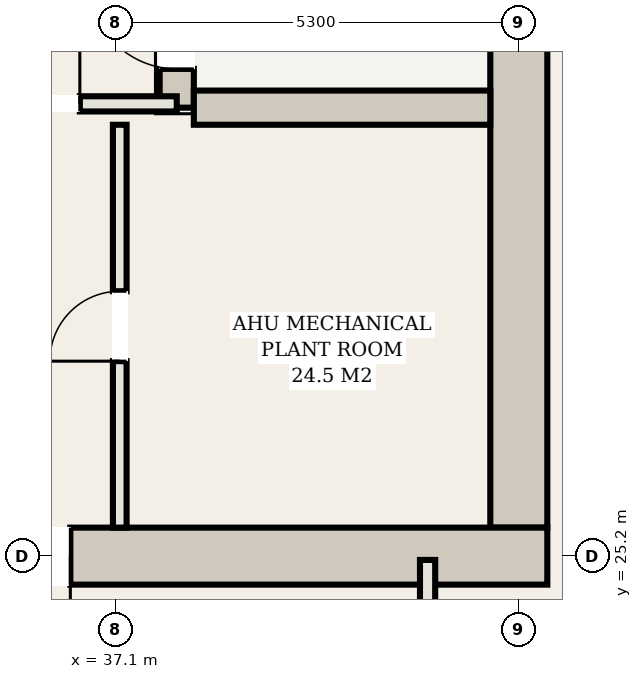
"""IFC4 building model, lengths in metres.
Left out: names, types, materials, properties, quantities, classifications, styles, units other than length and angle.
Written with IfcOpenShell. Run it as: python <this file> out.ifc"""

import sys

from ifc_helpers import new_model, si_unit, direction, frame, frame_2d, origin, place, context, subcontext, project, spatial, rectangle, extrude, element, fill, save


model = new_model("IFC4")
c1 = context("Model", 3, precision=1e-05, world=origin(), true_north=direction((0.0, 1.0)))
c2 = subcontext(c1, "Body", "Model", "MODEL_VIEW")
j1 = project(units=[si_unit("LENGTHUNIT", "METRE"), si_unit("PLANEANGLEUNIT", "RADIAN")], contexts=[c1])
p1 = place(None, origin())
s1 = spatial("IfcSite", under=j1, at=p1, CompositionType="ELEMENT")
p2 = place(p1, origin())
s2 = spatial("IfcBuilding", under=s1, at=p2, CompositionType="ELEMENT")
p3 = place(p2, frame((0.0, 0.0, 70.4)))
s3 = spatial("IfcBuildingStorey", under=s2, at=p3, CompositionType="ELEMENT", Elevation=70.4)
p4 = place(p3, frame((42.4, 25.575, 0.0), z_axis=(0.0, 0.0, 1.0), x_axis=(0.0, 1.0, 0.0)))
e1 = element("IfcWall", 1, at=p4, inside=s3, PredefinedType="SHEAR", context=c2, shape_type="SweptSolid", body=[
    extrude(rectangle(XDim=14.05, YDim=0.75, at=frame_2d((7.025, 0.0))), origin(), (0.0, 0.0, 1.0), 6.56),
])
p5 = place(p3, frame((34.6, 25.2, 0.0), z_axis=(0.0, 0.0, 1.0), x_axis=(1.0, 0.0, 0.0)))
e2 = element("IfcWall", 2, at=p5, inside=s3, PredefinedType="SHEAR", context=c2, shape_type="SweptSolid", body=[
    extrude(rectangle(XDim=8.175, YDim=0.75, at=frame_2d((4.087, 0.0))), origin(), (0.0, 0.0, 1.0), 6.56),
])
p6 = place(p5, frame((0.65, 0.0, 0.0)))
e3 = element("IfcOpeningElement", 3, at=p6, cuts=e2, PredefinedType="OPENING", context=c2, shape_type="SweptSolid", body=[
    extrude(rectangle(XDim=1.25, YDim=2.2, at=frame_2d((0.625, 1.1))), frame((0.0, 0.385, 0.0), z_axis=(0.0, -1.0, 0.0), x_axis=(1.0, 0.0, 0.0)), (0.0, 0.0, 1.0), 0.77),
])
p7 = place(p3, frame((37.9, 31.1, 0.0), z_axis=(0.0, 0.0, 1.0), x_axis=(0.0, 1.0, 0.0)))
e4 = element("IfcWall", 4, at=p7, inside=s3, PredefinedType="SHEAR", context=c2, shape_type="SweptSolid", body=[
    extrude(rectangle(XDim=8.525, YDim=0.45, at=frame_2d((4.262, 0.0))), origin(), (0.0, 0.0, 1.0), 6.56),
])
p8 = place(p7, frame((0.51, 0.0, 0.0)))
e5 = element("IfcOpeningElement", 5, at=p8, cuts=e4, PredefinedType="OPENING", context=c2, shape_type="SweptSolid", body=[
    extrude(rectangle(XDim=1.15, YDim=2.2, at=frame_2d((0.575, 1.1))), frame((0.0, 0.235, 0.0), z_axis=(0.0, -1.0, 0.0), x_axis=(1.0, 0.0, 0.0)), (0.0, 0.0, 1.0), 0.47),
])
p9 = place(p3, frame((38.125, 31.1, 0.0), z_axis=(0.0, 0.0, 1.0), x_axis=(1.0, 0.0, 0.0)))
e6 = element("IfcWall", 6, at=p9, inside=s3, PredefinedType="SHEAR", context=c2, shape_type="SweptSolid", body=[
    extrude(rectangle(XDim=3.9, YDim=0.45, at=frame_2d((1.95, 0.0))), origin(), (0.0, 0.0, 1.0), 6.56),
])
p10 = place(p3, frame((34.65, 31.15, 0.0), z_axis=(0.0, 0.0, 1.0), x_axis=(1.0, 0.0, 0.0)))
e7 = element("IfcWall", 7, at=p10, inside=s3, PredefinedType="PARTITIONING", context=c2, shape_type="SweptSolid", body=[
    extrude(rectangle(XDim=3.25, YDim=0.2, at=frame_2d((1.625, 0.0))), origin(), (0.0, 0.0, 1.0), 6.56),
])
p11 = place(p10, frame((0.725, 0.0, 0.0)))
e8 = element("IfcOpeningElement", 8, at=p11, cuts=e7, PredefinedType="OPENING", context=c2, shape_type="SweptSolid", body=[
    extrude(rectangle(XDim=1.25, YDim=2.2, at=frame_2d((0.625, 1.1))), frame((0.0, 0.11, 0.0), z_axis=(0.0, -1.0, 0.0), x_axis=(1.0, 0.0, 0.0)), (0.0, 0.0, 1.0), 0.22),
])
p12 = place(p3, frame((37.15, 25.575, 0.0), z_axis=(0.0, 0.0, 1.0), x_axis=(0.0, 1.0, 0.0)))
e9 = element("IfcWall", 9, at=p12, inside=s3, PredefinedType="PARTITIONING", context=c2, shape_type="SweptSolid", body=[
    extrude(rectangle(XDim=5.3, YDim=0.18, at=frame_2d((2.65, 0.0))), origin(), (0.0, 0.0, 1.0), 5.055),
])
p13 = place(p12, frame((2.19, 0.0, 0.0)))
e10 = element("IfcOpeningElement", 10, at=p13, cuts=e9, PredefinedType="OPENING", context=c2, shape_type="SweptSolid", body=[
    extrude(rectangle(XDim=0.92, YDim=2.15, at=frame_2d((0.46, 1.075))), frame((0.0, 0.1, 0.0), z_axis=(0.0, -1.0, 0.0), x_axis=(1.0, 0.0, 0.0)), (0.0, 0.0, 1.0), 0.2),
])
p14 = place(p3, frame((41.2, 22.4, 0.0), z_axis=(0.0, 0.0, 1.0), x_axis=(0.0, 1.0, 0.0)))
e11 = element("IfcWall", 11, at=p14, inside=s3, PredefinedType="PARTITIONING", context=c2, shape_type="SweptSolid", body=[
    extrude(rectangle(XDim=2.75, YDim=0.2, at=frame_2d((1.375, 0.0))), origin(), (0.0, 0.0, 1.0), 6.56),
])
p15 = place(p6, frame((1.25, 0.0, 0.0), z_axis=(0.0, 0.0, 1.0), x_axis=(-1.0, 0.0, 0.0)))
e12 = element("IfcDoor", 12, at=p15, inside=s3, OperationType="SINGLE_SWING_LEFT", PredefinedType="DOOR", context=c2, shape_type="SweptSolid", body=[
    extrude(rectangle(XDim=1.25, YDim=2.2, at=frame_2d((0.625, 1.1))), frame((0.0, 0.025, 0.0), z_axis=(0.0, -1.0, 0.0), x_axis=(1.0, 0.0, 0.0)), (0.0, 0.0, 1.0), 0.05),
])
fill(e3, e12)
p16 = place(p11, origin())
e13 = element("IfcDoor", 13, at=p16, inside=s3, OperationType="SINGLE_SWING_RIGHT", PredefinedType="DOOR", context=c2, shape_type="SweptSolid", body=[
    extrude(rectangle(XDim=1.25, YDim=2.2, at=frame_2d((0.625, 1.1))), frame((0.0, 0.025, 0.0), z_axis=(0.0, -1.0, 0.0), x_axis=(1.0, 0.0, 0.0)), (0.0, 0.0, 1.0), 0.05),
])
fill(e8, e13)
p17 = place(p8, origin())
e14 = element("IfcDoor", 14, at=p17, inside=s3, OperationType="SINGLE_SWING_RIGHT", PredefinedType="DOOR", context=c2, shape_type="SweptSolid", body=[
    extrude(rectangle(XDim=1.15, YDim=2.2, at=frame_2d((0.575, 1.1))), frame((0.0, 0.025, 0.0), z_axis=(0.0, -1.0, 0.0), x_axis=(1.0, 0.0, 0.0)), (0.0, 0.0, 1.0), 0.05),
])
fill(e5, e14)
p18 = place(p13, origin())
e15 = element("IfcDoor", 15, at=p18, inside=s3, OperationType="SINGLE_SWING_LEFT", PredefinedType="DOOR", context=c2, shape_type="SweptSolid", body=[
    extrude(rectangle(XDim=0.92, YDim=2.15, at=frame_2d((0.46, 1.075))), frame((0.0, 0.025, 0.0), z_axis=(0.0, -1.0, 0.0), x_axis=(1.0, 0.0, 0.0)), (0.0, 0.0, 1.0), 0.05),
])
fill(e10, e15)
save(model, sys.argv[1])
